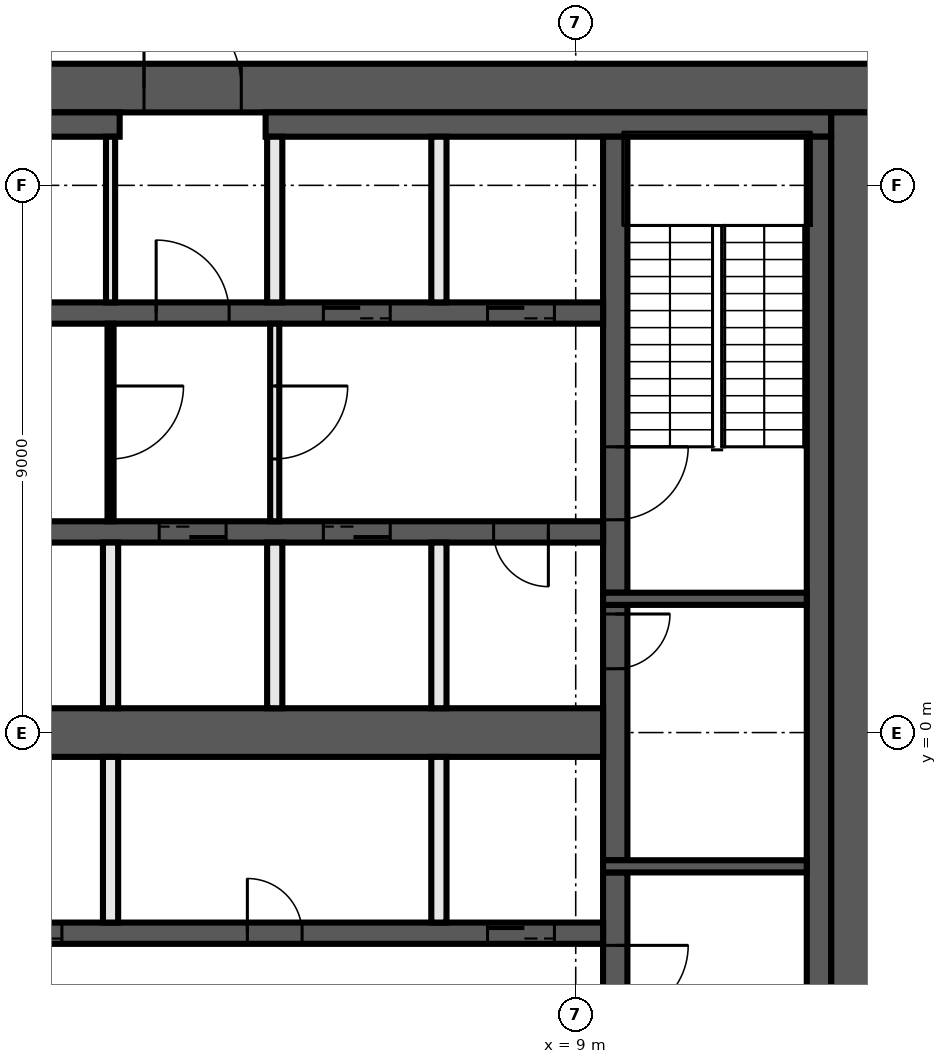
"""IFC4 building model, lengths in metres.
Left out: names, types, materials, properties, quantities, classifications, styles, units other than length and angle.
Written with IfcOpenShell. Run it as: python <this file> out.ifc"""

import sys

from ifc_helpers import new_model, si_unit, direction, frame, frame_2d, origin, place, context, subcontext, project, spatial, rectangle, extrude, element, fill, save


model = new_model("IFC4")
c1 = context("Model", 3, precision=1e-05, world=origin(), true_north=direction((0.0, 1.0)))
c2 = subcontext(c1, "Body", "Model", "MODEL_VIEW")
j1 = project(units=[si_unit("LENGTHUNIT", "METRE"), si_unit("PLANEANGLEUNIT", "RADIAN")], contexts=[c1])
p1 = place(None, origin())
s1 = spatial("IfcSite", under=j1, at=p1, CompositionType="ELEMENT")
p2 = place(p1, origin())
s2 = spatial("IfcBuilding", under=s1, at=p2, CompositionType="ELEMENT")
p3 = place(p2, frame((0.0, 0.0, 215.6)))
s3 = spatial("IfcBuildingStorey", under=s2, at=p3, CompositionType="ELEMENT", Elevation=215.6)
p4 = place(p3, frame((-14.0, 10.6, 0.0), z_axis=(0.0, 0.0, 1.0), x_axis=(1.0, 0.0, 0.0)))
e1 = element("IfcWall", 1, at=p4, inside=s3, PredefinedType="SHEAR", context=c2, shape_type="SweptSolid", body=[
    extrude(rectangle(XDim=28.0, YDim=0.8, at=frame_2d((14.0, 0.0))), origin(), (0.0, 0.0, 1.0), 4.4),
])
p5 = place(p4, frame((15.9, 0.0, 0.0)))
e2 = element("IfcOpeningElement", 2, at=p5, cuts=e1, PredefinedType="OPENING", context=c2, shape_type="SweptSolid", body=[
    extrude(rectangle(XDim=1.6, YDim=2.1, at=frame_2d((0.8, 1.05))), frame((0.0, 0.41, 0.0), z_axis=(0.0, -1.0, 0.0), x_axis=(1.0, 0.0, 0.0)), (0.0, 0.0, 1.0), 0.82),
])
p6 = place(p3, frame((13.6, 10.2, 0.0), z_axis=(0.0, 0.0, 1.0), x_axis=(0.0, -1.0, 0.0)))
e3 = element("IfcWall", 3, at=p6, inside=s3, PredefinedType="SHEAR", context=c2, shape_type="SweptSolid", body=[
    extrude(rectangle(XDim=20.4, YDim=0.8, at=frame_2d((10.2, 0.0))), origin(), (0.0, 0.0, 1.0), 4.4),
])
p7 = place(p3, frame((-13.2, 10.0, 0.0), z_axis=(0.0, 0.0, 1.0), x_axis=(1.0, 0.0, 0.0)))
e4 = element("IfcWall", 4, at=p7, inside=s3, PredefinedType="SHEAR", context=c2, shape_type="SweptSolid", body=[
    extrude(rectangle(XDim=14.7, YDim=0.4, at=frame_2d((7.35, 0.0))), origin(), (0.0, 0.0, 1.0), 4.4),
])
p8 = place(p3, frame((3.9, 10.0, 0.0), z_axis=(0.0, 0.0, 1.0), x_axis=(1.0, 0.0, 0.0)))
e5 = element("IfcWall", 5, at=p8, inside=s3, PredefinedType="SHEAR", context=c2, shape_type="SweptSolid", body=[
    extrude(rectangle(XDim=9.3, YDim=0.4, at=frame_2d((4.65, 0.0))), origin(), (0.0, 0.0, 1.0), 4.4),
])
p9 = place(p3, frame((13.0, 9.8, 0.0), z_axis=(0.0, 0.0, 1.0), x_axis=(0.0, -1.0, 0.0)))
e6 = element("IfcWall", 6, at=p9, inside=s3, PredefinedType="SHEAR", context=c2, shape_type="SweptSolid", body=[
    extrude(rectangle(XDim=19.6, YDim=0.4, at=frame_2d((9.8, 0.0))), origin(), (0.0, 0.0, 1.0), 4.4),
])
p10 = place(p3, frame((9.65, -2.3, 0.0), z_axis=(0.0, 0.0, 1.0), x_axis=(0.0, -1.0, 0.0)))
e7 = element("IfcWall", 7, at=p10, inside=s3, PredefinedType="SHEAR", context=c2, shape_type="SweptSolid", body=[
    extrude(rectangle(XDim=7.5, YDim=0.4, at=frame_2d((3.75, 0.0))), origin(), (0.0, 0.0, 1.0), 4.4),
])
p11 = place(p10, frame((1.2, 0.0, 0.0)))
e8 = element("IfcOpeningElement", 8, at=p11, cuts=e7, PredefinedType="OPENING", context=c2, shape_type="SweptSolid", body=[
    extrude(rectangle(XDim=1.2, YDim=2.1, at=frame_2d((0.6, 1.05))), frame((0.0, 0.21, 0.0), z_axis=(0.0, -1.0, 0.0), x_axis=(1.0, 0.0, 0.0)), (0.0, 0.0, 1.0), 0.42),
])
p12 = place(p3, frame((9.65, 2.1, 0.0), z_axis=(0.0, 0.0, 1.0), x_axis=(0.0, -1.0, 0.0)))
e9 = element("IfcWall", 9, at=p12, inside=s3, PredefinedType="SHEAR", context=c2, shape_type="SweptSolid", body=[
    extrude(rectangle(XDim=4.2, YDim=0.4, at=frame_2d((2.1, 0.0))), origin(), (0.0, 0.0, 1.0), 4.4),
])
p13 = place(p12, frame((0.15, 0.0, 0.0)))
e10 = element("IfcOpeningElement", 10, at=p13, cuts=e9, PredefinedType="OPENING", context=c2, shape_type="SweptSolid", body=[
    extrude(rectangle(XDim=0.9, YDim=2.1, at=frame_2d((0.45, 1.05))), frame((0.0, 0.21, 0.0), z_axis=(0.0, -1.0, 0.0), x_axis=(1.0, 0.0, 0.0)), (0.0, 0.0, 1.0), 0.42),
])
p14 = place(p3, frame((9.65, 9.8, 0.0), z_axis=(0.0, 0.0, 1.0), x_axis=(0.0, -1.0, 0.0)))
e11 = element("IfcWall", 11, at=p14, inside=s3, PredefinedType="SHEAR", context=c2, shape_type="SweptSolid", body=[
    extrude(rectangle(XDim=7.5, YDim=0.4, at=frame_2d((3.75, 0.0))), origin(), (0.0, 0.0, 1.0), 4.4),
])
p15 = place(p14, frame((5.1, 0.0, 0.0)))
e12 = element("IfcOpeningElement", 12, at=p15, cuts=e11, PredefinedType="OPENING", context=c2, shape_type="SweptSolid", body=[
    extrude(rectangle(XDim=1.2, YDim=2.1, at=frame_2d((0.6, 1.05))), frame((0.0, 0.21, 0.0), z_axis=(0.0, -1.0, 0.0), x_axis=(1.0, 0.0, 0.0)), (0.0, 0.0, 1.0), 0.42),
])
for number, where, z_axis, x_axis in (
    (13, (9.45, 2.2, 0.0), (0.0, 0.0, 1.0), (1.0, 0.0, 0.0)),
    (14, (9.45, -2.2, 0.0), (0.0, 0.0, 1.0), (1.0, 0.0, 0.0)),
):
    element("IfcWall", number, at=place(p3, frame(where, z_axis=z_axis, x_axis=x_axis)), inside=s3, PredefinedType="SHEAR", context=c2, shape_type="SweptSolid", body=[
        extrude(rectangle(XDim=3.35, YDim=0.2, at=frame_2d((1.675, 0.0))), origin(), (0.0, 0.0, 1.0), 4.4),
    ])
p16 = place(p3, frame((-9.45, 6.9, 0.0), z_axis=(0.0, 0.0, 1.0), x_axis=(1.0, 0.0, 0.0)))
e15 = element("IfcWall", 15, at=p16, inside=s3, PredefinedType="SHEAR", context=c2, shape_type="SweptSolid", body=[
    extrude(rectangle(XDim=18.9, YDim=0.35, at=frame_2d((9.45, 0.0))), origin(), (0.0, 0.0, 1.0), 4.4),
])
p17 = place(p16, frame((11.55, 0.0, 0.0)))
e16 = element("IfcOpeningElement", 16, at=p17, cuts=e15, PredefinedType="OPENING", context=c2, shape_type="SweptSolid", body=[
    extrude(rectangle(XDim=1.2, YDim=2.1, at=frame_2d((0.6, 1.05))), frame((0.0, 0.185, 0.0), z_axis=(0.0, -1.0, 0.0), x_axis=(1.0, 0.0, 0.0)), (0.0, 0.0, 1.0), 0.37),
])
p18 = place(p16, frame((14.3, 0.0, 0.0)))
e17 = element("IfcOpeningElement", 17, at=p18, cuts=e15, PredefinedType="OPENING", context=c2, shape_type="SweptSolid", body=[
    extrude(rectangle(XDim=1.1, YDim=2.1, at=frame_2d((0.55, 1.05))), frame((0.0, 0.185, 0.0), z_axis=(0.0, -1.0, 0.0), x_axis=(1.0, 0.0, 0.0)), (0.0, 0.0, 1.0), 0.37),
])
p19 = place(p16, frame((17.0, 0.0, 0.0)))
e18 = element("IfcOpeningElement", 18, at=p19, cuts=e15, PredefinedType="OPENING", context=c2, shape_type="SweptSolid", body=[
    extrude(rectangle(XDim=1.1, YDim=2.1, at=frame_2d((0.55, 1.05))), frame((0.0, 0.185, 0.0), z_axis=(0.0, -1.0, 0.0), x_axis=(1.0, 0.0, 0.0)), (0.0, 0.0, 1.0), 0.37),
])
p20 = place(p16, frame((0.9, 0.0, 0.0)))
e19 = element("IfcOpeningElement", 19, at=p20, cuts=e15, PredefinedType="OPENING", context=c2, shape_type="SweptSolid", body=[
    extrude(rectangle(XDim=0.9, YDim=2.1, at=frame_2d((0.45, 1.05))), frame((0.0, 0.185, 0.0), z_axis=(0.0, -1.0, 0.0), x_axis=(1.0, 0.0, 0.0)), (0.0, 0.0, 1.0), 0.37),
])
p21 = place(p16, frame((6.3, 0.0, 0.0)))
e20 = element("IfcOpeningElement", 20, at=p21, cuts=e15, PredefinedType="OPENING", context=c2, shape_type="SweptSolid", body=[
    extrude(rectangle(XDim=0.9, YDim=2.1, at=frame_2d((0.45, 1.05))), frame((0.0, 0.185, 0.0), z_axis=(0.0, -1.0, 0.0), x_axis=(1.0, 0.0, 0.0)), (0.0, 0.0, 1.0), 0.37),
])
p22 = place(p3, frame((9.45, 3.3, 0.0), z_axis=(0.0, 0.0, 1.0), x_axis=(-1.0, 0.0, 0.0)))
e21 = element("IfcWall", 21, at=p22, inside=s3, PredefinedType="SHEAR", context=c2, shape_type="SweptSolid", body=[
    extrude(rectangle(XDim=18.9, YDim=0.35, at=frame_2d((9.45, 0.0))), origin(), (0.0, 0.0, 1.0), 4.4),
])
p23 = place(p22, frame((6.2, 0.0, 0.0)))
e22 = element("IfcOpeningElement", 22, at=p23, cuts=e21, PredefinedType="OPENING", context=c2, shape_type="SweptSolid", body=[
    extrude(rectangle(XDim=1.1, YDim=2.1, at=frame_2d((0.55, 1.05))), frame((0.0, 0.185, 0.0), z_axis=(0.0, -1.0, 0.0), x_axis=(1.0, 0.0, 0.0)), (0.0, 0.0, 1.0), 0.37),
])
p24 = place(p22, frame((3.5, 0.0, 0.0)))
e23 = element("IfcOpeningElement", 23, at=p24, cuts=e21, PredefinedType="OPENING", context=c2, shape_type="SweptSolid", body=[
    extrude(rectangle(XDim=1.1, YDim=2.1, at=frame_2d((0.55, 1.05))), frame((0.0, 0.185, 0.0), z_axis=(0.0, -1.0, 0.0), x_axis=(1.0, 0.0, 0.0)), (0.0, 0.0, 1.0), 0.37),
])
p25 = place(p22, frame((0.9, 0.0, 0.0)))
e24 = element("IfcOpeningElement", 24, at=p25, cuts=e21, PredefinedType="OPENING", context=c2, shape_type="SweptSolid", body=[
    extrude(rectangle(XDim=0.9, YDim=2.1, at=frame_2d((0.45, 1.05))), frame((0.0, 0.185, 0.0), z_axis=(0.0, -1.0, 0.0), x_axis=(1.0, 0.0, 0.0)), (0.0, 0.0, 1.0), 0.37),
])
p26 = place(p22, frame((15.75, 0.0, 0.0)))
e25 = element("IfcOpeningElement", 25, at=p26, cuts=e21, PredefinedType="OPENING", context=c2, shape_type="SweptSolid", body=[
    extrude(rectangle(XDim=0.9, YDim=2.1, at=frame_2d((0.45, 1.05))), frame((0.0, 0.185, 0.0), z_axis=(0.0, -1.0, 0.0), x_axis=(1.0, 0.0, 0.0)), (0.0, 0.0, 1.0), 0.37),
])
p27 = place(p22, frame((10.35, 0.0, 0.0)))
e26 = element("IfcOpeningElement", 26, at=p27, cuts=e21, PredefinedType="OPENING", context=c2, shape_type="SweptSolid", body=[
    extrude(rectangle(XDim=0.9, YDim=2.1, at=frame_2d((0.45, 1.05))), frame((0.0, 0.185, 0.0), z_axis=(0.0, -1.0, 0.0), x_axis=(1.0, 0.0, 0.0)), (0.0, 0.0, 1.0), 0.37),
])
p28 = place(p3, frame((-9.45, -3.3, 0.0), z_axis=(0.0, 0.0, 1.0), x_axis=(1.0, 0.0, 0.0)))
e27 = element("IfcWall", 27, at=p28, inside=s3, PredefinedType="SHEAR", context=c2, shape_type="SweptSolid", body=[
    extrude(rectangle(XDim=18.9, YDim=0.35, at=frame_2d((9.45, 0.0))), origin(), (0.0, 0.0, 1.0), 4.4),
])
p29 = place(p28, frame((0.8, 0.0, 0.0)))
e28 = element("IfcOpeningElement", 28, at=p29, cuts=e27, PredefinedType="OPENING", context=c2, shape_type="SweptSolid", body=[
    extrude(rectangle(XDim=1.1, YDim=2.1, at=frame_2d((0.55, 1.05))), frame((0.0, 0.185, 0.0), z_axis=(0.0, -1.0, 0.0), x_axis=(1.0, 0.0, 0.0)), (0.0, 0.0, 1.0), 0.37),
])
p30 = place(p28, frame((3.5, 0.0, 0.0)))
e29 = element("IfcOpeningElement", 29, at=p30, cuts=e27, PredefinedType="OPENING", context=c2, shape_type="SweptSolid", body=[
    extrude(rectangle(XDim=1.1, YDim=2.1, at=frame_2d((0.55, 1.05))), frame((0.0, 0.185, 0.0), z_axis=(0.0, -1.0, 0.0), x_axis=(1.0, 0.0, 0.0)), (0.0, 0.0, 1.0), 0.37),
])
p31 = place(p28, frame((6.2, 0.0, 0.0)))
e30 = element("IfcOpeningElement", 30, at=p31, cuts=e27, PredefinedType="OPENING", context=c2, shape_type="SweptSolid", body=[
    extrude(rectangle(XDim=1.1, YDim=2.1, at=frame_2d((0.55, 1.05))), frame((0.0, 0.185, 0.0), z_axis=(0.0, -1.0, 0.0), x_axis=(1.0, 0.0, 0.0)), (0.0, 0.0, 1.0), 0.37),
])
p32 = place(p28, frame((8.9, 0.0, 0.0)))
e31 = element("IfcOpeningElement", 31, at=p32, cuts=e27, PredefinedType="OPENING", context=c2, shape_type="SweptSolid", body=[
    extrude(rectangle(XDim=1.1, YDim=2.1, at=frame_2d((0.55, 1.05))), frame((0.0, 0.185, 0.0), z_axis=(0.0, -1.0, 0.0), x_axis=(1.0, 0.0, 0.0)), (0.0, 0.0, 1.0), 0.37),
])
p33 = place(p28, frame((17.0, 0.0, 0.0)))
e32 = element("IfcOpeningElement", 32, at=p33, cuts=e27, PredefinedType="OPENING", context=c2, shape_type="SweptSolid", body=[
    extrude(rectangle(XDim=1.1, YDim=2.1, at=frame_2d((0.55, 1.05))), frame((0.0, 0.185, 0.0), z_axis=(0.0, -1.0, 0.0), x_axis=(1.0, 0.0, 0.0)), (0.0, 0.0, 1.0), 0.37),
])
p34 = place(p28, frame((13.05, 0.0, 0.0)))
e33 = element("IfcOpeningElement", 33, at=p34, cuts=e27, PredefinedType="OPENING", context=c2, shape_type="SweptSolid", body=[
    extrude(rectangle(XDim=0.9, YDim=2.1, at=frame_2d((0.45, 1.05))), frame((0.0, 0.185, 0.0), z_axis=(0.0, -1.0, 0.0), x_axis=(1.0, 0.0, 0.0)), (0.0, 0.0, 1.0), 0.37),
])
p35 = place(p3, frame((-9.45, 0.0, 0.0), z_axis=(0.0, 0.0, 1.0), x_axis=(1.0, 0.0, 0.0)))
e34 = element("IfcWall", 34, at=p35, inside=s3, PredefinedType="SHEAR", context=c2, shape_type="SweptSolid", body=[
    extrude(rectangle(XDim=18.9, YDim=0.8, at=frame_2d((9.45, 0.0))), origin(), (0.0, 0.0, 1.0), 4.4),
])
for number, where, z_axis, x_axis in (
    (35, (6.75, -3.125, 0.0), (0.0, 0.0, 1.0), (0.0, 1.0, 0.0)),
    (36, (6.75, 0.4, 0.0), (0.0, 0.0, 1.0), (0.0, 1.0, 0.0)),
    (37, (6.75, 7.075, 0.0), (0.0, 0.0, 1.0), (0.0, 1.0, 0.0)),
):
    element("IfcWall", number, at=place(p3, frame(where, z_axis=z_axis, x_axis=x_axis)), inside=s3, PredefinedType="SOLIDWALL", context=c2, shape_type="SweptSolid", body=[
        extrude(rectangle(XDim=2.725, YDim=0.25, at=frame_2d((1.363, 0.0))), origin(), (0.0, 0.0, 1.0), 4.4),
    ])
p36 = place(p3, frame((4.05, 6.725, 0.0), z_axis=(0.0, 0.0, 1.0), x_axis=(0.0, -1.0, 0.0)))
e38 = element("IfcWall", 38, at=p36, inside=s3, PredefinedType="PARTITIONING", context=c2, shape_type="SweptSolid", body=[
    extrude(rectangle(XDim=3.25, YDim=0.15, at=frame_2d((1.625, 0.0))), origin(), (0.0, 0.0, 1.0), 4.4),
])
p37 = place(p36, frame((1.025, 0.0, 0.0)))
e39 = element("IfcOpeningElement", 39, at=p37, cuts=e38, PredefinedType="OPENING", context=c2, shape_type="SweptSolid", body=[
    extrude(rectangle(XDim=1.2, YDim=2.1, at=frame_2d((0.6, 1.05))), frame((0.0, 0.085, 0.0), z_axis=(0.0, -1.0, 0.0), x_axis=(1.0, 0.0, 0.0)), (0.0, 0.0, 1.0), 0.17),
])
for number, where, z_axis, x_axis in (
    (40, (4.05, 0.4, 0.0), (0.0, 0.0, 1.0), (0.0, 1.0, 0.0)),
    (41, (4.05, 7.075, 0.0), (0.0, 0.0, 1.0), (0.0, 1.0, 0.0)),
):
    element("IfcWall", number, at=place(p3, frame(where, z_axis=z_axis, x_axis=x_axis)), inside=s3, PredefinedType="SOLIDWALL", context=c2, shape_type="SweptSolid", body=[
        extrude(rectangle(XDim=2.725, YDim=0.25, at=frame_2d((1.363, 0.0))), origin(), (0.0, 0.0, 1.0), 4.4),
    ])
p38 = place(p3, frame((1.35, 7.075, 0.0), z_axis=(0.0, 0.0, 1.0), x_axis=(0.0, 1.0, 0.0)))
e42 = element("IfcWall", 42, at=p38, inside=s3, PredefinedType="PARTITIONING", context=c2, shape_type="SweptSolid", body=[
    extrude(rectangle(XDim=2.725, YDim=0.15, at=frame_2d((1.363, 0.0))), origin(), (0.0, 0.0, 1.0), 4.4),
])
p39 = place(p3, frame((1.35, 6.725, 0.0), z_axis=(0.0, 0.0, 1.0), x_axis=(0.0, -1.0, 0.0)))
e43 = element("IfcWall", 43, at=p39, inside=s3, PredefinedType="PARTITIONING", context=c2, shape_type="SweptSolid", body=[
    extrude(rectangle(XDim=3.25, YDim=0.1, at=frame_2d((1.625, 0.0))), origin(), (0.0, 0.0, 1.0), 4.4),
])
p40 = place(p39, frame((1.025, 0.0, 0.0)))
e44 = element("IfcOpeningElement", 44, at=p40, cuts=e43, PredefinedType="OPENING", context=c2, shape_type="SweptSolid", body=[
    extrude(rectangle(XDim=1.2, YDim=2.1, at=frame_2d((0.6, 1.05))), frame((0.0, 0.06, 0.0), z_axis=(0.0, -1.0, 0.0), x_axis=(1.0, 0.0, 0.0)), (0.0, 0.0, 1.0), 0.12),
])
for number, where, z_axis, x_axis in (
    (45, (1.35, -3.125, 0.0), (0.0, 0.0, 1.0), (0.0, 1.0, 0.0)),
    (46, (1.35, 0.4, 0.0), (0.0, 0.0, 1.0), (0.0, 1.0, 0.0)),
):
    element("IfcWall", number, at=place(p3, frame(where, z_axis=z_axis, x_axis=x_axis)), inside=s3, PredefinedType="SOLIDWALL", context=c2, shape_type="SweptSolid", body=[
        extrude(rectangle(XDim=2.725, YDim=0.25, at=frame_2d((1.363, 0.0))), origin(), (0.0, 0.0, 1.0), 4.4),
    ])
p41 = place(p13, origin())
e47 = element("IfcDoor", 47, at=p41, inside=s3, OperationType="SINGLE_SWING_RIGHT", PredefinedType="DOOR", context=c2, shape_type="SweptSolid", body=[
    extrude(rectangle(XDim=0.9, YDim=2.1, at=frame_2d((0.45, 1.05))), frame((0.0, 0.025, 0.0), z_axis=(0.0, -1.0, 0.0), x_axis=(1.0, 0.0, 0.0)), (0.0, 0.0, 1.0), 0.05),
])
fill(e10, e47)
p42 = place(p5, origin())
e48 = element("IfcDoor", 48, at=p42, inside=s3, OperationType="DOUBLE_DOOR_SINGLE_SWING", PredefinedType="DOOR", context=c2, shape_type="SweptSolid", body=[
    extrude(rectangle(XDim=1.6, YDim=2.1, at=frame_2d((0.8, 1.05))), frame((0.0, 0.025, 0.0), z_axis=(0.0, -1.0, 0.0), x_axis=(1.0, 0.0, 0.0)), (0.0, 0.0, 1.0), 0.05),
])
fill(e2, e48)
p43 = place(p17, origin())
e49 = element("IfcDoor", 49, at=p43, inside=s3, OperationType="SINGLE_SWING_LEFT", PredefinedType="DOOR", context=c2, shape_type="SweptSolid", body=[
    extrude(rectangle(XDim=1.2, YDim=2.1, at=frame_2d((0.6, 1.05))), frame((0.0, 0.025, 0.0), z_axis=(0.0, -1.0, 0.0), x_axis=(1.0, 0.0, 0.0)), (0.0, 0.0, 1.0), 0.05),
])
fill(e16, e49)
p44 = place(p18, origin())
e50 = element("IfcDoor", 50, at=p44, inside=s3, OperationType="DOUBLE_DOOR_SLIDING", PredefinedType="DOOR", context=c2, shape_type="SweptSolid", body=[
    extrude(rectangle(XDim=1.1, YDim=2.1, at=frame_2d((0.55, 1.05))), frame((0.0, 0.025, 0.0), z_axis=(0.0, -1.0, 0.0), x_axis=(1.0, 0.0, 0.0)), (0.0, 0.0, 1.0), 0.05),
])
fill(e17, e50)
p45 = place(p19, origin())
e51 = element("IfcDoor", 51, at=p45, inside=s3, OperationType="DOUBLE_DOOR_SLIDING", PredefinedType="DOOR", context=c2, shape_type="SweptSolid", body=[
    extrude(rectangle(XDim=1.1, YDim=2.1, at=frame_2d((0.55, 1.05))), frame((0.0, 0.025, 0.0), z_axis=(0.0, -1.0, 0.0), x_axis=(1.0, 0.0, 0.0)), (0.0, 0.0, 1.0), 0.05),
])
fill(e18, e51)
p46 = place(p23, origin())
e52 = element("IfcDoor", 52, at=p46, inside=s3, OperationType="DOUBLE_DOOR_SLIDING", PredefinedType="DOOR", context=c2, shape_type="SweptSolid", body=[
    extrude(rectangle(XDim=1.1, YDim=2.1, at=frame_2d((0.55, 1.05))), frame((0.0, 0.025, 0.0), z_axis=(0.0, -1.0, 0.0), x_axis=(1.0, 0.0, 0.0)), (0.0, 0.0, 1.0), 0.05),
])
fill(e22, e52)
p47 = place(p24, origin())
e53 = element("IfcDoor", 53, at=p47, inside=s3, OperationType="DOUBLE_DOOR_SLIDING", PredefinedType="DOOR", context=c2, shape_type="SweptSolid", body=[
    extrude(rectangle(XDim=1.1, YDim=2.1, at=frame_2d((0.55, 1.05))), frame((0.0, 0.025, 0.0), z_axis=(0.0, -1.0, 0.0), x_axis=(1.0, 0.0, 0.0)), (0.0, 0.0, 1.0), 0.05),
])
fill(e23, e53)
p48 = place(p25, origin())
e54 = element("IfcDoor", 54, at=p48, inside=s3, OperationType="SINGLE_SWING_LEFT", PredefinedType="DOOR", context=c2, shape_type="SweptSolid", body=[
    extrude(rectangle(XDim=0.9, YDim=2.1, at=frame_2d((0.45, 1.05))), frame((0.0, 0.025, 0.0), z_axis=(0.0, -1.0, 0.0), x_axis=(1.0, 0.0, 0.0)), (0.0, 0.0, 1.0), 0.05),
])
fill(e24, e54)
p49 = place(p32, origin())
e55 = element("IfcDoor", 55, at=p49, inside=s3, OperationType="DOUBLE_DOOR_SLIDING", PredefinedType="DOOR", context=c2, shape_type="SweptSolid", body=[
    extrude(rectangle(XDim=1.1, YDim=2.1, at=frame_2d((0.55, 1.05))), frame((0.0, 0.025, 0.0), z_axis=(0.0, -1.0, 0.0), x_axis=(1.0, 0.0, 0.0)), (0.0, 0.0, 1.0), 0.05),
])
fill(e31, e55)
p50 = place(p33, origin())
e56 = element("IfcDoor", 56, at=p50, inside=s3, OperationType="DOUBLE_DOOR_SLIDING", PredefinedType="DOOR", context=c2, shape_type="SweptSolid", body=[
    extrude(rectangle(XDim=1.1, YDim=2.1, at=frame_2d((0.55, 1.05))), frame((0.0, 0.025, 0.0), z_axis=(0.0, -1.0, 0.0), x_axis=(1.0, 0.0, 0.0)), (0.0, 0.0, 1.0), 0.05),
])
fill(e32, e56)
p51 = place(p34, origin())
e57 = element("IfcDoor", 57, at=p51, inside=s3, OperationType="SINGLE_SWING_RIGHT", PredefinedType="DOOR", context=c2, shape_type="SweptSolid", body=[
    extrude(rectangle(XDim=0.9, YDim=2.1, at=frame_2d((0.45, 1.05))), frame((0.0, 0.025, 0.0), z_axis=(0.0, -1.0, 0.0), x_axis=(1.0, 0.0, 0.0)), (0.0, 0.0, 1.0), 0.05),
])
fill(e33, e57)
p52 = place(p15, origin())
e58 = element("IfcDoor", 58, at=p52, inside=s3, OperationType="SINGLE_SWING_LEFT", PredefinedType="DOOR", context=c2, shape_type="SweptSolid", body=[
    extrude(rectangle(XDim=1.2, YDim=2.1, at=frame_2d((0.6, 1.05))), frame((0.0, 0.025, 0.0), z_axis=(0.0, -1.0, 0.0), x_axis=(1.0, 0.0, 0.0)), (0.0, 0.0, 1.0), 0.05),
])
fill(e12, e58)
p53 = place(p11, origin())
e59 = element("IfcDoor", 59, at=p53, inside=s3, OperationType="SINGLE_SWING_RIGHT", PredefinedType="DOOR", context=c2, shape_type="SweptSolid", body=[
    extrude(rectangle(XDim=1.2, YDim=2.1, at=frame_2d((0.6, 1.05))), frame((0.0, 0.025, 0.0), z_axis=(0.0, -1.0, 0.0), x_axis=(1.0, 0.0, 0.0)), (0.0, 0.0, 1.0), 0.05),
])
fill(e8, e59)
p54 = place(p40, origin())
e60 = element("IfcDoor", 60, at=p54, inside=s3, OperationType="SINGLE_SWING_LEFT", PredefinedType="DOOR", context=c2, shape_type="SweptSolid", body=[
    extrude(rectangle(XDim=1.2, YDim=2.1, at=frame_2d((0.6, 1.05))), frame((0.0, 0.025, 0.0), z_axis=(0.0, -1.0, 0.0), x_axis=(1.0, 0.0, 0.0)), (0.0, 0.0, 1.0), 0.05),
])
fill(e44, e60)
p55 = place(p37, origin())
e61 = element("IfcDoor", 61, at=p55, inside=s3, OperationType="SINGLE_SWING_RIGHT", PredefinedType="DOOR", context=c2, shape_type="SweptSolid", body=[
    extrude(rectangle(XDim=1.2, YDim=2.1, at=frame_2d((0.6, 1.05))), frame((0.0, 0.025, 0.0), z_axis=(0.0, -1.0, 0.0), x_axis=(1.0, 0.0, 0.0)), (0.0, 0.0, 1.0), 0.05),
])
fill(e39, e61)
save(model, sys.argv[1])
